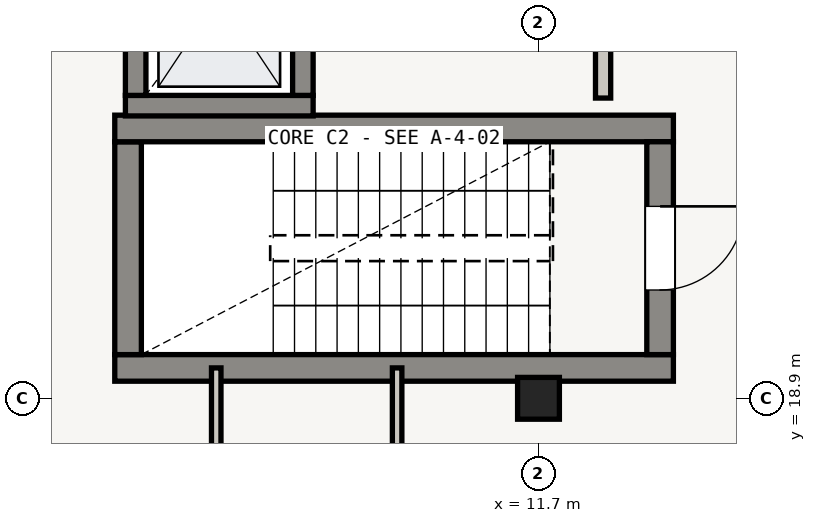
"""IFC4 building model, lengths in metres.
Left out: names, types, materials, properties, quantities, classifications, styles, units other than length and angle.
Written with IfcOpenShell. Run it as: python <this file> out.ifc"""

import sys

from ifc_helpers import new_model, si_unit, direction, frame, frame_2d, origin, origin_2d, place, context, subcontext, project, spatial, rectangle, extrude, element, fill, save


model = new_model("IFC4")
c1 = context("Model", 3, precision=1e-05, world=origin(), true_north=direction((0.0, 1.0)))
c2 = subcontext(c1, "Body", "Model", "MODEL_VIEW")
j1 = project(units=[si_unit("LENGTHUNIT", "METRE"), si_unit("PLANEANGLEUNIT", "RADIAN")], contexts=[c1])
p1 = place(None, origin())
s1 = spatial("IfcSite", under=j1, at=p1, CompositionType="ELEMENT")
p2 = place(p1, origin())
s2 = spatial("IfcBuilding", under=s1, at=p2, CompositionType="ELEMENT")
p3 = place(p2, frame((0.0, 0.0, 8.7)))
s3 = spatial("IfcBuildingStorey", under=s2, at=p3, CompositionType="ELEMENT", Elevation=8.7)
p4 = place(p3, frame((11.7, 18.9, 0.0), z_axis=(0.0, 0.0, 1.0), x_axis=(1.0, 0.0, 0.0)))
e1 = element("IfcColumn", 1, at=p4, inside=s3, PredefinedType="COLUMN", context=c2, shape_type="SweptSolid", body=[
    extrude(rectangle(XDim=0.55, YDim=0.55, at=origin_2d()), origin(), (0.0, 0.0, 1.0), 3.92),
])
p5 = place(p3, frame((13.475, 19.3, 0.0), z_axis=(0.0, 0.0, 1.0), x_axis=(-1.0, 0.0, 0.0)))
e2 = element("IfcWall", 2, at=p5, inside=s3, PredefinedType="SHEAR", context=c2, shape_type="SweptSolid", body=[
    extrude(rectangle(XDim=7.35, YDim=0.35, at=frame_2d((3.675, 0.0))), origin(), (0.0, 0.0, 1.0), 3.92),
])
p6 = place(p3, frame((6.3, 19.475, 0.0), z_axis=(0.0, 0.0, 1.0), x_axis=(0.0, 1.0, 0.0)))
e3 = element("IfcWall", 3, at=p6, inside=s3, PredefinedType="SHEAR", context=c2, shape_type="SweptSolid", body=[
    extrude(rectangle(XDim=2.8, YDim=0.35, at=frame_2d((1.4, 0.0))), origin(), (0.0, 0.0, 1.0), 3.92),
])
p7 = place(p3, frame((6.125, 22.45, 0.0), z_axis=(0.0, 0.0, 1.0), x_axis=(1.0, 0.0, 0.0)))
e4 = element("IfcWall", 4, at=p7, inside=s3, PredefinedType="SHEAR", context=c2, shape_type="SweptSolid", body=[
    extrude(rectangle(XDim=7.35, YDim=0.35, at=frame_2d((3.675, 0.0))), origin(), (0.0, 0.0, 1.0), 3.92),
])
p8 = place(p3, frame((13.3, 22.275, 0.0), z_axis=(0.0, 0.0, 1.0), x_axis=(0.0, -1.0, 0.0)))
e5 = element("IfcWall", 5, at=p8, inside=s3, PredefinedType="SHEAR", context=c2, shape_type="SweptSolid", body=[
    extrude(rectangle(XDim=2.8, YDim=0.35, at=frame_2d((1.4, 0.0))), origin(), (0.0, 0.0, 1.0), 3.92),
])
p9 = place(p8, frame((0.85, 0.0, 0.0)))
e6 = element("IfcOpeningElement", 6, at=p9, cuts=e5, PredefinedType="OPENING", context=c2, shape_type="SweptSolid", body=[
    extrude(rectangle(XDim=1.1, YDim=2.05, at=frame_2d((0.55, 1.025))), frame((0.0, 0.175, 0.0), z_axis=(0.0, -1.0, 0.0), x_axis=(1.0, 0.0, 0.0)), (0.0, 0.0, 1.0), 0.35),
])
p10 = place(p3, frame((8.735, 22.75, 0.0), z_axis=(0.0, 0.0, 1.0), x_axis=(-1.0, 0.0, 0.0)))
e7 = element("IfcWall", 7, at=p10, inside=s3, PredefinedType="SHEAR", context=c2, shape_type="SweptSolid", body=[
    extrude(rectangle(XDim=2.47, YDim=0.27, at=frame_2d((1.235, 0.0))), origin(), (0.0, 0.0, 1.0), 3.92),
])
p11 = place(p3, frame((6.4, 22.885, 0.0), z_axis=(0.0, 0.0, 1.0), x_axis=(0.0, 1.0, 0.0)))
e8 = element("IfcWall", 8, at=p11, inside=s3, PredefinedType="SHEAR", context=c2, shape_type="SweptSolid", body=[
    extrude(rectangle(XDim=2.63, YDim=0.27, at=frame_2d((1.315, 0.0))), origin(), (0.0, 0.0, 1.0), 3.92),
])
p12 = place(p3, frame((8.6, 25.515, 0.0), z_axis=(0.0, 0.0, 1.0), x_axis=(0.0, -1.0, 0.0)))
e9 = element("IfcWall", 9, at=p12, inside=s3, PredefinedType="SHEAR", context=c2, shape_type="SweptSolid", body=[
    extrude(rectangle(XDim=2.63, YDim=0.27, at=frame_2d((1.315, 0.0))), origin(), (0.0, 0.0, 1.0), 3.92),
])
p13 = place(p12, frame((0.755, 0.0, 0.0)))
e10 = element("IfcOpeningElement", 10, at=p13, cuts=e9, PredefinedType="OPENING", context=c2, shape_type="SweptSolid", body=[
    extrude(rectangle(XDim=1.12, YDim=2.1, at=frame_2d((0.56, 1.05))), frame((0.0, 0.135, 0.0), z_axis=(0.0, -1.0, 0.0), x_axis=(1.0, 0.0, 0.0)), (0.0, 0.0, 1.0), 0.27),
])
p14 = place(p3, frame((12.55, 25.75, 0.0), z_axis=(0.0, 0.0, 1.0), x_axis=(0.0, -1.0, 0.0)))
e11 = element("IfcWall", 11, at=p14, inside=s3, PredefinedType="SOLIDWALL", context=c2, shape_type="SweptSolid", body=[
    extrude(rectangle(XDim=2.9, YDim=0.2, at=frame_2d((1.45, 0.0))), origin(), (0.0, 0.0, 1.0), 2.94),
])
p15 = place(p14, frame((0.875, 0.0, 0.0)))
e12 = element("IfcOpeningElement", 12, at=p15, cuts=e11, PredefinedType="OPENING", context=c2, shape_type="SweptSolid", body=[
    extrude(rectangle(XDim=1.15, YDim=2.05, at=frame_2d((0.575, 1.025))), frame((0.0, 0.1, 0.0), z_axis=(0.0, -1.0, 0.0), x_axis=(1.0, 0.0, 0.0)), (0.0, 0.0, 1.0), 0.2),
])
for number, where, z_axis, x_axis in (
    (13, (7.46, 19.3, 0.0), (0.0, 0.0, 1.0), (0.0, -1.0, 0.0)),
    (14, (9.84, 15.92, 0.0), (0.0, 0.0, 1.0), (0.0, 1.0, 0.0)),
):
    element("IfcWall", number, at=place(p3, frame(where, z_axis=z_axis, x_axis=x_axis)), inside=s3, PredefinedType="PARTITIONING", context=c2, shape_type="SweptSolid", body=[
        extrude(rectangle(XDim=3.38, YDim=0.125, at=frame_2d((1.69, 0.0))), origin(), (0.0, 0.0, 1.0), 2.94),
    ])
p16 = place(p9, origin())
e15 = element("IfcDoor", 15, at=p16, inside=s3, OperationType="SINGLE_SWING_LEFT", PredefinedType="DOOR", context=c2, shape_type="SweptSolid", body=[
    extrude(rectangle(XDim=1.1, YDim=2.05, at=frame_2d((0.55, 1.025))), frame((0.0, 0.025, 0.0), z_axis=(0.0, -1.0, 0.0), x_axis=(1.0, 0.0, 0.0)), (0.0, 0.0, 1.0), 0.05),
])
fill(e6, e15)
save(model, sys.argv[1])
